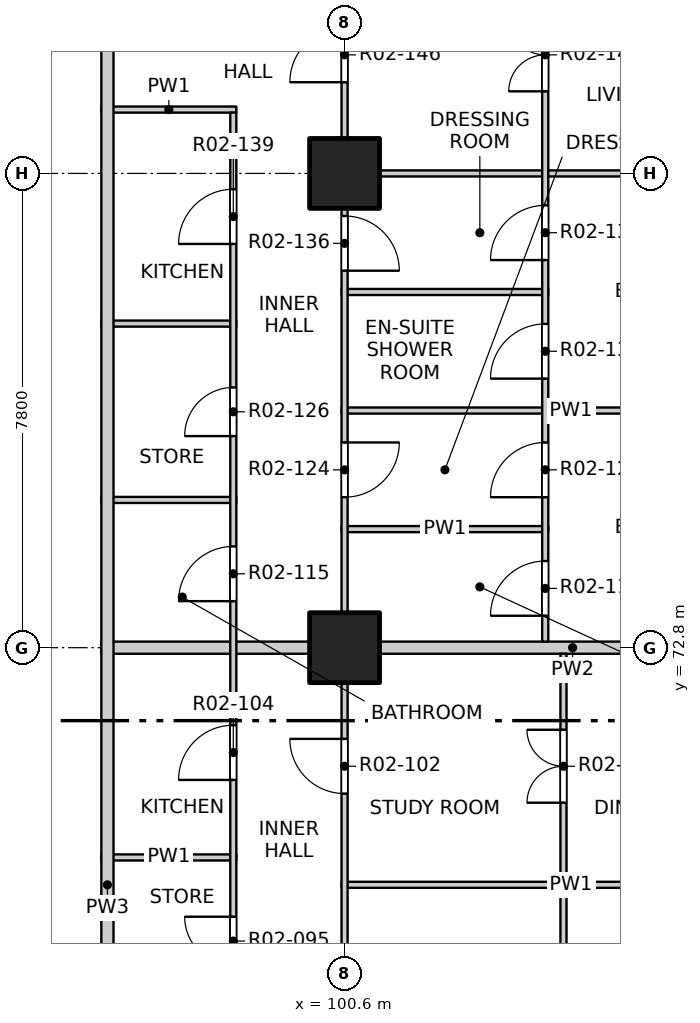
"""IFC4 building model, lengths in metres.
Left out: names, types, materials, properties, quantities, classifications, styles, units other than length and angle.
Written with IfcOpenShell. Run it as: python <this file> out.ifc"""

import sys

from ifc_helpers import new_model, si_unit, direction, frame, frame_2d, origin, origin_2d, place, context, subcontext, project, spatial, rectangle, extrude, element, fill, save


model = new_model("IFC4")
c1 = context("Model", 3, precision=1e-05, world=origin(), true_north=direction((0.0, 1.0)))
c2 = subcontext(c1, "Body", "Model", "MODEL_VIEW")
j1 = project(units=[si_unit("LENGTHUNIT", "METRE"), si_unit("PLANEANGLEUNIT", "RADIAN")], contexts=[c1])
p1 = place(None, origin())
s1 = spatial("IfcSite", under=j1, at=p1, CompositionType="ELEMENT")
p2 = place(p1, origin())
s2 = spatial("IfcBuilding", under=s1, at=p2, CompositionType="ELEMENT")
p3 = place(p2, frame((0.0, 0.0, 36.5)))
s3 = spatial("IfcBuildingStorey", under=s2, at=p3, CompositionType="ELEMENT", Elevation=36.5)
for number, where, z_axis, x_axis in (
    (1, (100.6, 72.8, -0.25), (0.0, 0.0, 1.0), (1.0, 0.0, 0.0)),
    (2, (100.6, 80.6, -0.25), (0.0, 0.0, 1.0), (1.0, 0.0, 0.0)),
):
    element("IfcColumn", number, at=place(p3, frame(where, z_axis=z_axis, x_axis=x_axis)), inside=s3, PredefinedType="COLUMN", context=c2, shape_type="SweptSolid", body=[
        extrude(rectangle(XDim=1.15, YDim=1.15, at=origin_2d()), origin(), (0.0, 0.0, 1.0), 3.4),
    ])
p4 = place(p3, frame((100.55, 68.9, 0.0), z_axis=(0.0, 0.0, 1.0), x_axis=(1.0, 0.0, 0.0)))
e3 = element("IfcWall", 3, at=p4, inside=s3, PredefinedType="PARTITIONING", context=c2, shape_type="SweptSolid", body=[
    extrude(rectangle(XDim=7.55, YDim=0.1, at=frame_2d((3.775, 0.0))), origin(), (0.0, 0.0, 1.0), 3.15),
])
p5 = place(p3, frame((96.6, 69.35, 0.0), z_axis=(0.0, 0.0, 1.0), x_axis=(1.0, 0.0, 0.0)))
e4 = element("IfcWall", 4, at=p5, inside=s3, PredefinedType="PARTITIONING", context=c2, shape_type="SweptSolid", body=[
    extrude(rectangle(XDim=2.22, YDim=0.1, at=frame_2d((1.11, 0.0))), origin(), (0.0, 0.0, 1.0), 3.15),
])
p6 = place(p3, frame((96.6, 72.8, 0.0), z_axis=(0.0, 0.0, 1.0), x_axis=(1.0, 0.0, 0.0)))
e5 = element("IfcWall", 5, at=p6, inside=s3, PredefinedType="PARTITIONING", context=c2, shape_type="SweptSolid", body=[
    extrude(rectangle(XDim=4.0, YDim=0.2, at=frame_2d((2.0, 0.0))), origin(), (0.0, 0.0, 1.0), 3.15),
])
p7 = place(p3, frame((100.6, 72.8, 0.0), z_axis=(0.0, 0.0, 1.0), x_axis=(1.0, 0.0, 0.0)))
e6 = element("IfcWall", 6, at=p7, inside=s3, PredefinedType="PARTITIONING", context=c2, shape_type="SweptSolid", body=[
    extrude(rectangle(XDim=7.5, YDim=0.2, at=frame_2d((3.75, 0.0))), origin(), (0.0, 0.0, 1.0), 2.55),
])
p8 = place(p3, frame((100.55, 74.75, 0.0), z_axis=(0.0, 0.0, 1.0), x_axis=(1.0, 0.0, 0.0)))
e7 = element("IfcWall", 7, at=p8, inside=s3, PredefinedType="PARTITIONING", context=c2, shape_type="SweptSolid", body=[
    extrude(rectangle(XDim=3.4, YDim=0.1, at=frame_2d((1.7, 0.0))), origin(), (0.0, 0.0, 1.0), 3.15),
])
p9 = place(p3, frame((96.6, 75.23, 0.0), z_axis=(0.0, 0.0, 1.0), x_axis=(1.0, 0.0, 0.0)))
e8 = element("IfcWall", 8, at=p9, inside=s3, PredefinedType="PARTITIONING", context=c2, shape_type="SweptSolid", body=[
    extrude(rectangle(XDim=2.22, YDim=0.1, at=frame_2d((1.11, 0.0))), origin(), (0.0, 0.0, 1.0), 3.15),
])
p10 = place(p3, frame((100.55, 76.7, 0.0), z_axis=(0.0, 0.0, 1.0), x_axis=(1.0, 0.0, 0.0)))
e9 = element("IfcWall", 9, at=p10, inside=s3, PredefinedType="PARTITIONING", context=c2, shape_type="SweptSolid", body=[
    extrude(rectangle(XDim=7.55, YDim=0.1, at=frame_2d((3.775, 0.0))), origin(), (0.0, 0.0, 1.0), 3.15),
])
p11 = place(p3, frame((96.6, 78.13, 0.0), z_axis=(0.0, 0.0, 1.0), x_axis=(1.0, 0.0, 0.0)))
e10 = element("IfcWall", 10, at=p11, inside=s3, PredefinedType="PARTITIONING", context=c2, shape_type="SweptSolid", body=[
    extrude(rectangle(XDim=2.22, YDim=0.1, at=frame_2d((1.11, 0.0))), origin(), (0.0, 0.0, 1.0), 3.15),
])
p12 = place(p3, frame((100.55, 78.65, 0.0), z_axis=(0.0, 0.0, 1.0), x_axis=(1.0, 0.0, 0.0)))
e11 = element("IfcWall", 11, at=p12, inside=s3, PredefinedType="PARTITIONING", context=c2, shape_type="SweptSolid", body=[
    extrude(rectangle(XDim=3.4, YDim=0.1, at=frame_2d((1.7, 0.0))), origin(), (0.0, 0.0, 1.0), 3.15),
])
p13 = place(p3, frame((100.55, 80.6, 0.0), z_axis=(0.0, 0.0, 1.0), x_axis=(1.0, 0.0, 0.0)))
e12 = element("IfcWall", 12, at=p13, inside=s3, PredefinedType="PARTITIONING", context=c2, shape_type="SweptSolid", body=[
    extrude(rectangle(XDim=7.55, YDim=0.1, at=frame_2d((3.775, 0.0))), origin(), (0.0, 0.0, 1.0), 2.55),
])
p14 = place(p3, frame((96.6, 81.65, 0.0), z_axis=(0.0, 0.0, 1.0), x_axis=(1.0, 0.0, 0.0)))
e13 = element("IfcWall", 13, at=p14, inside=s3, PredefinedType="PARTITIONING", context=c2, shape_type="SweptSolid", body=[
    extrude(rectangle(XDim=2.22, YDim=0.1, at=frame_2d((1.11, 0.0))), origin(), (0.0, 0.0, 1.0), 3.15),
])
p15 = place(p3, frame((96.7, 53.4, 0.0), z_axis=(0.0, 0.0, 1.0), x_axis=(0.0, 1.0, 0.0)))
e14 = element("IfcWall", 14, at=p15, inside=s3, PredefinedType="PARTITIONING", context=c2, shape_type="SweptSolid", body=[
    extrude(rectangle(XDim=31.0, YDim=0.2, at=frame_2d((15.5, 0.0))), origin(), (0.0, 0.0, 1.0), 3.15),
])
p16 = place(p15, frame((2.425, 0.0, 0.0)))
e15 = element("IfcOpeningElement", 15, at=p16, cuts=e14, PredefinedType="OPENING", context=c2, shape_type="SweptSolid", body=[
    extrude(rectangle(XDim=1.0, YDim=2.1, at=frame_2d((0.5, 1.05))), frame((0.0, 0.11, 0.0), z_axis=(0.0, -1.0, 0.0), x_axis=(1.0, 0.0, 0.0)), (0.0, 0.0, 1.0), 0.22),
])
p17 = place(p15, frame((13.375, 0.0, 0.0)))
e16 = element("IfcOpeningElement", 16, at=p17, cuts=e14, PredefinedType="OPENING", context=c2, shape_type="SweptSolid", body=[
    extrude(rectangle(XDim=1.0, YDim=2.1, at=frame_2d((0.5, 1.05))), frame((0.0, 0.11, 0.0), z_axis=(0.0, -1.0, 0.0), x_axis=(1.0, 0.0, 0.0)), (0.0, 0.0, 1.0), 0.22),
])
p18 = place(p15, frame((29.525, 0.0, 0.0)))
e17 = element("IfcOpeningElement", 17, at=p18, cuts=e14, PredefinedType="OPENING", context=c2, shape_type="SweptSolid", body=[
    extrude(rectangle(XDim=1.0, YDim=2.1, at=frame_2d((0.5, 1.05))), frame((0.0, 0.11, 0.0), z_axis=(0.0, -1.0, 0.0), x_axis=(1.0, 0.0, 0.0)), (0.0, 0.0, 1.0), 0.22),
])
p19 = place(p3, frame((98.77, 66.65, 0.0), z_axis=(0.0, 0.0, 1.0), x_axis=(0.0, 1.0, 0.0)))
e18 = element("IfcWall", 18, at=p19, inside=s3, PredefinedType="PARTITIONING", context=c2, shape_type="SweptSolid", body=[
    extrude(rectangle(XDim=14.95, YDim=0.1, at=frame_2d((7.475, 0.0))), origin(), (0.0, 0.0, 1.0), 3.15),
])
p20 = place(p19, frame((0.925, 0.0, 0.0)))
e19 = element("IfcOpeningElement", 19, at=p20, cuts=e18, PredefinedType="OPENING", context=c2, shape_type="SweptSolid", body=[
    extrude(rectangle(XDim=0.8, YDim=2.1, at=frame_2d((0.4, 1.05))), frame((0.0, 0.06, 0.0), z_axis=(0.0, -1.0, 0.0), x_axis=(1.0, 0.0, 0.0)), (0.0, 0.0, 1.0), 0.12),
])
p21 = place(p19, frame((3.975, 0.0, 0.0)))
e20 = element("IfcOpeningElement", 20, at=p21, cuts=e18, PredefinedType="OPENING", context=c2, shape_type="SweptSolid", body=[
    extrude(rectangle(XDim=0.9, YDim=2.1, at=frame_2d((0.45, 1.05))), frame((0.0, 0.06, 0.0), z_axis=(0.0, -1.0, 0.0), x_axis=(1.0, 0.0, 0.0)), (0.0, 0.0, 1.0), 0.12),
])
p22 = place(p19, frame((6.915, 0.0, 0.0)))
e21 = element("IfcOpeningElement", 21, at=p22, cuts=e18, PredefinedType="OPENING", context=c2, shape_type="SweptSolid", body=[
    extrude(rectangle(XDim=0.9, YDim=2.1, at=frame_2d((0.45, 1.05))), frame((0.0, 0.06, 0.0), z_axis=(0.0, -1.0, 0.0), x_axis=(1.0, 0.0, 0.0)), (0.0, 0.0, 1.0), 0.12),
])
p23 = place(p19, frame((9.63, 0.0, 0.0)))
e22 = element("IfcOpeningElement", 22, at=p23, cuts=e18, PredefinedType="OPENING", context=c2, shape_type="SweptSolid", body=[
    extrude(rectangle(XDim=0.8, YDim=2.1, at=frame_2d((0.4, 1.05))), frame((0.0, 0.06, 0.0), z_axis=(0.0, -1.0, 0.0), x_axis=(1.0, 0.0, 0.0)), (0.0, 0.0, 1.0), 0.12),
])
p24 = place(p19, frame((12.79, 0.0, 0.0)))
e23 = element("IfcOpeningElement", 23, at=p24, cuts=e18, PredefinedType="OPENING", context=c2, shape_type="SweptSolid", body=[
    extrude(rectangle(XDim=0.9, YDim=2.1, at=frame_2d((0.45, 1.05))), frame((0.0, 0.06, 0.0), z_axis=(0.0, -1.0, 0.0), x_axis=(1.0, 0.0, 0.0)), (0.0, 0.0, 1.0), 0.12),
])
p25 = place(p3, frame((100.6, 49.4, 0.0), z_axis=(0.0, 0.0, 1.0), x_axis=(0.0, 1.0, 0.0)))
e24 = element("IfcWall", 24, at=p25, inside=s3, PredefinedType="PARTITIONING", context=c2, shape_type="SweptSolid", body=[
    extrude(rectangle(XDim=31.2, YDim=0.1, at=frame_2d((15.6, 0.0))), origin(), (0.0, 0.0, 1.0), 3.15),
])
p26 = place(p25, frame((2.475, 0.0, 0.0)))
e25 = element("IfcOpeningElement", 25, at=p26, cuts=e24, PredefinedType="OPENING", context=c2, shape_type="SweptSolid", body=[
    extrude(rectangle(XDim=0.9, YDim=2.1, at=frame_2d((0.45, 1.05))), frame((0.0, 0.06, 0.0), z_axis=(0.0, -1.0, 0.0), x_axis=(1.0, 0.0, 0.0)), (0.0, 0.0, 1.0), 0.12),
])
p27 = place(p25, frame((5.4, 0.0, 0.0)))
e26 = element("IfcOpeningElement", 26, at=p27, cuts=e24, PredefinedType="OPENING", context=c2, shape_type="SweptSolid", body=[
    extrude(rectangle(XDim=0.9, YDim=2.1, at=frame_2d((0.45, 1.05))), frame((0.0, 0.06, 0.0), z_axis=(0.0, -1.0, 0.0), x_axis=(1.0, 0.0, 0.0)), (0.0, 0.0, 1.0), 0.12),
])
p28 = place(p25, frame((10.275, 0.0, 0.0)))
e27 = element("IfcOpeningElement", 27, at=p28, cuts=e24, PredefinedType="OPENING", context=c2, shape_type="SweptSolid", body=[
    extrude(rectangle(XDim=0.9, YDim=2.1, at=frame_2d((0.45, 1.05))), frame((0.0, 0.06, 0.0), z_axis=(0.0, -1.0, 0.0), x_axis=(1.0, 0.0, 0.0)), (0.0, 0.0, 1.0), 0.12),
])
p29 = place(p25, frame((14.0, 0.0, 0.0)))
e28 = element("IfcOpeningElement", 28, at=p29, cuts=e24, PredefinedType="OPENING", context=c2, shape_type="SweptSolid", body=[
    extrude(rectangle(XDim=0.9, YDim=2.1, at=frame_2d((0.45, 1.05))), frame((0.0, 0.06, 0.0), z_axis=(0.0, -1.0, 0.0), x_axis=(1.0, 0.0, 0.0)), (0.0, 0.0, 1.0), 0.12),
])
p30 = place(p25, frame((17.1, 0.0, 0.0)))
e29 = element("IfcOpeningElement", 29, at=p30, cuts=e24, PredefinedType="OPENING", context=c2, shape_type="SweptSolid", body=[
    extrude(rectangle(XDim=0.9, YDim=2.1, at=frame_2d((0.45, 1.05))), frame((0.0, 0.06, 0.0), z_axis=(0.0, -1.0, 0.0), x_axis=(1.0, 0.0, 0.0)), (0.0, 0.0, 1.0), 0.12),
])
p31 = place(p25, frame((21.0, 0.0, 0.0)))
e30 = element("IfcOpeningElement", 30, at=p31, cuts=e24, PredefinedType="OPENING", context=c2, shape_type="SweptSolid", body=[
    extrude(rectangle(XDim=0.9, YDim=2.1, at=frame_2d((0.45, 1.05))), frame((0.0, 0.06, 0.0), z_axis=(0.0, -1.0, 0.0), x_axis=(1.0, 0.0, 0.0)), (0.0, 0.0, 1.0), 0.12),
])
p32 = place(p25, frame((25.875, 0.0, 0.0)))
e31 = element("IfcOpeningElement", 31, at=p32, cuts=e24, PredefinedType="OPENING", context=c2, shape_type="SweptSolid", body=[
    extrude(rectangle(XDim=0.9, YDim=2.1, at=frame_2d((0.45, 1.05))), frame((0.0, 0.06, 0.0), z_axis=(0.0, -1.0, 0.0), x_axis=(1.0, 0.0, 0.0)), (0.0, 0.0, 1.0), 0.12),
])
p33 = place(p25, frame((29.6, 0.0, 0.0)))
e32 = element("IfcOpeningElement", 32, at=p33, cuts=e24, PredefinedType="OPENING", context=c2, shape_type="SweptSolid", body=[
    extrude(rectangle(XDim=0.9, YDim=2.1, at=frame_2d((0.45, 1.05))), frame((0.0, 0.06, 0.0), z_axis=(0.0, -1.0, 0.0), x_axis=(1.0, 0.0, 0.0)), (0.0, 0.0, 1.0), 0.12),
])
p34 = place(p3, frame((100.6, 80.6, 0.0), z_axis=(0.0, 0.0, 1.0), x_axis=(0.0, 1.0, 0.0)))
e33 = element("IfcWall", 33, at=p34, inside=s3, PredefinedType="PARTITIONING", context=c2, shape_type="SweptSolid", body=[
    extrude(rectangle(XDim=7.5, YDim=0.1, at=frame_2d((3.75, 0.0))), origin(), (0.0, 0.0, 1.0), 2.55),
])
p35 = place(p34, frame((1.5, 0.0, 0.0)))
e34 = element("IfcOpeningElement", 34, at=p35, cuts=e33, PredefinedType="OPENING", context=c2, shape_type="SweptSolid", body=[
    extrude(rectangle(XDim=0.9, YDim=2.1, at=frame_2d((0.45, 1.05))), frame((0.0, 0.06, 0.0), z_axis=(0.0, -1.0, 0.0), x_axis=(1.0, 0.0, 0.0)), (0.0, 0.0, 1.0), 0.12),
])
p36 = place(p34, frame((5.4, 0.0, 0.0)))
e35 = element("IfcOpeningElement", 35, at=p36, cuts=e33, PredefinedType="OPENING", context=c2, shape_type="SweptSolid", body=[
    extrude(rectangle(XDim=0.9, YDim=2.1, at=frame_2d((0.45, 1.05))), frame((0.0, 0.06, 0.0), z_axis=(0.0, -1.0, 0.0), x_axis=(1.0, 0.0, 0.0)), (0.0, 0.0, 1.0), 0.12),
])
p37 = place(p3, frame((103.9, 72.9, 0.0), z_axis=(0.0, 0.0, 1.0), x_axis=(0.0, 1.0, 0.0)))
e36 = element("IfcWall", 36, at=p37, inside=s3, PredefinedType="PARTITIONING", context=c2, shape_type="SweptSolid", body=[
    extrude(rectangle(XDim=15.2, YDim=0.1, at=frame_2d((7.6, 0.0))), origin(), (0.0, 0.0, 1.0), 3.15),
])
p38 = place(p37, frame((0.425, 0.0, 0.0)))
e37 = element("IfcOpeningElement", 37, at=p38, cuts=e36, PredefinedType="OPENING", context=c2, shape_type="SweptSolid", body=[
    extrude(rectangle(XDim=0.9, YDim=2.1, at=frame_2d((0.45, 1.05))), frame((0.0, 0.06, 0.0), z_axis=(0.0, -1.0, 0.0), x_axis=(1.0, 0.0, 0.0)), (0.0, 0.0, 1.0), 0.12),
])
p39 = place(p37, frame((2.375, 0.0, 0.0)))
e38 = element("IfcOpeningElement", 38, at=p39, cuts=e36, PredefinedType="OPENING", context=c2, shape_type="SweptSolid", body=[
    extrude(rectangle(XDim=0.9, YDim=2.1, at=frame_2d((0.45, 1.05))), frame((0.0, 0.06, 0.0), z_axis=(0.0, -1.0, 0.0), x_axis=(1.0, 0.0, 0.0)), (0.0, 0.0, 1.0), 0.12),
])
p40 = place(p37, frame((4.325, 0.0, 0.0)))
e39 = element("IfcOpeningElement", 39, at=p40, cuts=e36, PredefinedType="OPENING", context=c2, shape_type="SweptSolid", body=[
    extrude(rectangle(XDim=0.9, YDim=2.1, at=frame_2d((0.45, 1.05))), frame((0.0, 0.06, 0.0), z_axis=(0.0, -1.0, 0.0), x_axis=(1.0, 0.0, 0.0)), (0.0, 0.0, 1.0), 0.12),
])
p41 = place(p37, frame((6.275, 0.0, 0.0)))
e40 = element("IfcOpeningElement", 40, at=p41, cuts=e36, PredefinedType="OPENING", context=c2, shape_type="SweptSolid", body=[
    extrude(rectangle(XDim=0.9, YDim=2.1, at=frame_2d((0.45, 1.05))), frame((0.0, 0.06, 0.0), z_axis=(0.0, -1.0, 0.0), x_axis=(1.0, 0.0, 0.0)), (0.0, 0.0, 1.0), 0.12),
])
p42 = place(p37, frame((9.05, 0.0, 0.0)))
e41 = element("IfcOpeningElement", 41, at=p42, cuts=e36, PredefinedType="OPENING", context=c2, shape_type="SweptSolid", body=[
    extrude(rectangle(XDim=1.2, YDim=2.1, at=frame_2d((0.6, 1.05))), frame((0.0, 0.06, 0.0), z_axis=(0.0, -1.0, 0.0), x_axis=(1.0, 0.0, 0.0)), (0.0, 0.0, 1.0), 0.12),
])
p43 = place(p37, frame((12.95, 0.0, 0.0)))
e42 = element("IfcOpeningElement", 42, at=p43, cuts=e36, PredefinedType="OPENING", context=c2, shape_type="SweptSolid", body=[
    extrude(rectangle(XDim=1.2, YDim=2.1, at=frame_2d((0.6, 1.05))), frame((0.0, 0.06, 0.0), z_axis=(0.0, -1.0, 0.0), x_axis=(1.0, 0.0, 0.0)), (0.0, 0.0, 1.0), 0.12),
])
p44 = place(p3, frame((104.2, 61.2, 0.0), z_axis=(0.0, 0.0, 1.0), x_axis=(0.0, 1.0, 0.0)))
e43 = element("IfcWall", 43, at=p44, inside=s3, PredefinedType="PARTITIONING", context=c2, shape_type="SweptSolid", body=[
    extrude(rectangle(XDim=11.5, YDim=0.1, at=frame_2d((5.75, 0.0))), origin(), (0.0, 0.0, 1.0), 3.15),
])
p45 = place(p44, frame((0.425, 0.0, 0.0)))
e44 = element("IfcOpeningElement", 44, at=p45, cuts=e43, PredefinedType="OPENING", context=c2, shape_type="SweptSolid", body=[
    extrude(rectangle(XDim=0.9, YDim=2.1, at=frame_2d((0.45, 1.05))), frame((0.0, 0.06, 0.0), z_axis=(0.0, -1.0, 0.0), x_axis=(1.0, 0.0, 0.0)), (0.0, 0.0, 1.0), 0.12),
])
p46 = place(p44, frame((2.375, 0.0, 0.0)))
e45 = element("IfcOpeningElement", 45, at=p46, cuts=e43, PredefinedType="OPENING", context=c2, shape_type="SweptSolid", body=[
    extrude(rectangle(XDim=0.9, YDim=2.1, at=frame_2d((0.45, 1.05))), frame((0.0, 0.06, 0.0), z_axis=(0.0, -1.0, 0.0), x_axis=(1.0, 0.0, 0.0)), (0.0, 0.0, 1.0), 0.12),
])
p47 = place(p44, frame((5.15, 0.0, 0.0)))
e46 = element("IfcOpeningElement", 46, at=p47, cuts=e43, PredefinedType="OPENING", context=c2, shape_type="SweptSolid", body=[
    extrude(rectangle(XDim=1.2, YDim=2.1, at=frame_2d((0.6, 1.05))), frame((0.0, 0.06, 0.0), z_axis=(0.0, -1.0, 0.0), x_axis=(1.0, 0.0, 0.0)), (0.0, 0.0, 1.0), 0.12),
])
p48 = place(p44, frame((9.05, 0.0, 0.0)))
e47 = element("IfcOpeningElement", 47, at=p48, cuts=e43, PredefinedType="OPENING", context=c2, shape_type="SweptSolid", body=[
    extrude(rectangle(XDim=1.2, YDim=2.1, at=frame_2d((0.6, 1.05))), frame((0.0, 0.06, 0.0), z_axis=(0.0, -1.0, 0.0), x_axis=(1.0, 0.0, 0.0)), (0.0, 0.0, 1.0), 0.12),
])
p49 = place(p20, origin())
e48 = element("IfcDoor", 48, at=p49, inside=s3, OperationType="SINGLE_SWING_RIGHT", PredefinedType="DOOR", context=c2, shape_type="SweptSolid", body=[
    extrude(rectangle(XDim=0.8, YDim=2.1, at=frame_2d((0.4, 1.05))), frame((0.0, 0.025, 0.0), z_axis=(0.0, -1.0, 0.0), x_axis=(1.0, 0.0, 0.0)), (0.0, 0.0, 1.0), 0.05),
])
fill(e19, e48)
p50 = place(p31, origin())
e49 = element("IfcDoor", 49, at=p50, inside=s3, OperationType="SINGLE_SWING_RIGHT", PredefinedType="DOOR", context=c2, shape_type="SweptSolid", body=[
    extrude(rectangle(XDim=0.9, YDim=2.1, at=frame_2d((0.45, 1.05))), frame((0.0, 0.025, 0.0), z_axis=(0.0, -1.0, 0.0), x_axis=(1.0, 0.0, 0.0)), (0.0, 0.0, 1.0), 0.05),
])
fill(e30, e49)
p51 = place(p48, origin())
e50 = element("IfcDoor", 50, at=p51, inside=s3, OperationType="DOUBLE_DOOR_SINGLE_SWING", PredefinedType="DOOR", context=c2, shape_type="SweptSolid", body=[
    extrude(rectangle(XDim=1.2, YDim=2.1, at=frame_2d((0.6, 1.05))), frame((0.0, 0.025, 0.0), z_axis=(0.0, -1.0, 0.0), x_axis=(1.0, 0.0, 0.0)), (0.0, 0.0, 1.0), 0.05),
])
fill(e47, e50)
p52 = place(p21, origin())
e51 = element("IfcDoor", 51, at=p52, inside=s3, OperationType="SINGLE_SWING_LEFT", PredefinedType="DOOR", context=c2, shape_type="SweptSolid", body=[
    extrude(rectangle(XDim=0.9, YDim=2.1, at=frame_2d((0.45, 1.05))), frame((0.0, 0.025, 0.0), z_axis=(0.0, -1.0, 0.0), x_axis=(1.0, 0.0, 0.0)), (0.0, 0.0, 1.0), 0.05),
])
fill(e20, e51)
p53 = place(p38, origin())
e52 = element("IfcDoor", 52, at=p53, inside=s3, OperationType="SINGLE_SWING_LEFT", PredefinedType="DOOR", context=c2, shape_type="SweptSolid", body=[
    extrude(rectangle(XDim=0.9, YDim=2.1, at=frame_2d((0.45, 1.05))), frame((0.0, 0.025, 0.0), z_axis=(0.0, -1.0, 0.0), x_axis=(1.0, 0.0, 0.0)), (0.0, 0.0, 1.0), 0.05),
])
fill(e37, e52)
p54 = place(p22, origin())
e53 = element("IfcDoor", 53, at=p54, inside=s3, OperationType="SINGLE_SWING_LEFT", PredefinedType="DOOR", context=c2, shape_type="SweptSolid", body=[
    extrude(rectangle(XDim=0.9, YDim=2.1, at=frame_2d((0.45, 1.05))), frame((0.0, 0.025, 0.0), z_axis=(0.0, -1.0, 0.0), x_axis=(1.0, 0.0, 0.0)), (0.0, 0.0, 1.0), 0.05),
])
fill(e21, e53)
p55 = place(p32, origin())
e54 = element("IfcDoor", 54, at=p55, inside=s3, OperationType="SINGLE_SWING_LEFT", PredefinedType="DOOR", context=c2, shape_type="SweptSolid", body=[
    extrude(rectangle(XDim=0.9, YDim=2.1, at=frame_2d((0.45, 1.05))), frame((0.0, 0.025, 0.0), z_axis=(0.0, -1.0, 0.0), x_axis=(1.0, 0.0, 0.0)), (0.0, 0.0, 1.0), 0.05),
])
fill(e31, e54)
p56 = place(p39, origin())
e55 = element("IfcDoor", 55, at=p56, inside=s3, OperationType="SINGLE_SWING_LEFT", PredefinedType="DOOR", context=c2, shape_type="SweptSolid", body=[
    extrude(rectangle(XDim=0.9, YDim=2.1, at=frame_2d((0.45, 1.05))), frame((0.0, 0.025, 0.0), z_axis=(0.0, -1.0, 0.0), x_axis=(1.0, 0.0, 0.0)), (0.0, 0.0, 1.0), 0.05),
])
fill(e38, e55)
p57 = place(p23, origin())
e56 = element("IfcDoor", 56, at=p57, inside=s3, OperationType="SINGLE_SWING_LEFT", PredefinedType="DOOR", context=c2, shape_type="SweptSolid", body=[
    extrude(rectangle(XDim=0.8, YDim=2.1, at=frame_2d((0.4, 1.05))), frame((0.0, 0.025, 0.0), z_axis=(0.0, -1.0, 0.0), x_axis=(1.0, 0.0, 0.0)), (0.0, 0.0, 1.0), 0.05),
])
fill(e22, e56)
p58 = place(p40, origin())
e57 = element("IfcDoor", 57, at=p58, inside=s3, OperationType="SINGLE_SWING_LEFT", PredefinedType="DOOR", context=c2, shape_type="SweptSolid", body=[
    extrude(rectangle(XDim=0.9, YDim=2.1, at=frame_2d((0.45, 1.05))), frame((0.0, 0.025, 0.0), z_axis=(0.0, -1.0, 0.0), x_axis=(1.0, 0.0, 0.0)), (0.0, 0.0, 1.0), 0.05),
])
fill(e39, e57)
p59 = place(p33, origin())
e58 = element("IfcDoor", 58, at=p59, inside=s3, OperationType="SINGLE_SWING_RIGHT", PredefinedType="DOOR", context=c2, shape_type="SweptSolid", body=[
    extrude(rectangle(XDim=0.9, YDim=2.1, at=frame_2d((0.45, 1.05))), frame((0.0, 0.025, 0.0), z_axis=(0.0, -1.0, 0.0), x_axis=(1.0, 0.0, 0.0)), (0.0, 0.0, 1.0), 0.05),
])
fill(e32, e58)
p60 = place(p41, origin())
e59 = element("IfcDoor", 59, at=p60, inside=s3, OperationType="SINGLE_SWING_LEFT", PredefinedType="DOOR", context=c2, shape_type="SweptSolid", body=[
    extrude(rectangle(XDim=0.9, YDim=2.1, at=frame_2d((0.45, 1.05))), frame((0.0, 0.025, 0.0), z_axis=(0.0, -1.0, 0.0), x_axis=(1.0, 0.0, 0.0)), (0.0, 0.0, 1.0), 0.05),
])
fill(e40, e59)
p61 = place(p24, origin())
e60 = element("IfcDoor", 60, at=p61, inside=s3, OperationType="SINGLE_SWING_LEFT", PredefinedType="DOOR", context=c2, shape_type="SweptSolid", body=[
    extrude(rectangle(XDim=0.9, YDim=2.1, at=frame_2d((0.45, 1.05))), frame((0.0, 0.025, 0.0), z_axis=(0.0, -1.0, 0.0), x_axis=(1.0, 0.0, 0.0)), (0.0, 0.0, 1.0), 0.05),
])
fill(e23, e60)
p62 = place(p35, origin())
e61 = element("IfcDoor", 61, at=p62, inside=s3, OperationType="SINGLE_SWING_LEFT", PredefinedType="DOOR", context=c2, shape_type="SweptSolid", body=[
    extrude(rectangle(XDim=0.9, YDim=2.1, at=frame_2d((0.45, 1.05))), frame((0.0, 0.025, 0.0), z_axis=(0.0, -1.0, 0.0), x_axis=(1.0, 0.0, 0.0)), (0.0, 0.0, 1.0), 0.05),
])
fill(e34, e61)
p63 = place(p42, origin())
e62 = element("IfcDoor", 62, at=p63, inside=s3, OperationType="DOUBLE_DOOR_SINGLE_SWING", PredefinedType="DOOR", context=c2, shape_type="SweptSolid", body=[
    extrude(rectangle(XDim=1.2, YDim=2.1, at=frame_2d((0.6, 1.05))), frame((0.0, 0.025, 0.0), z_axis=(0.0, -1.0, 0.0), x_axis=(1.0, 0.0, 0.0)), (0.0, 0.0, 1.0), 0.05),
])
fill(e41, e62)
save(model, sys.argv[1])
